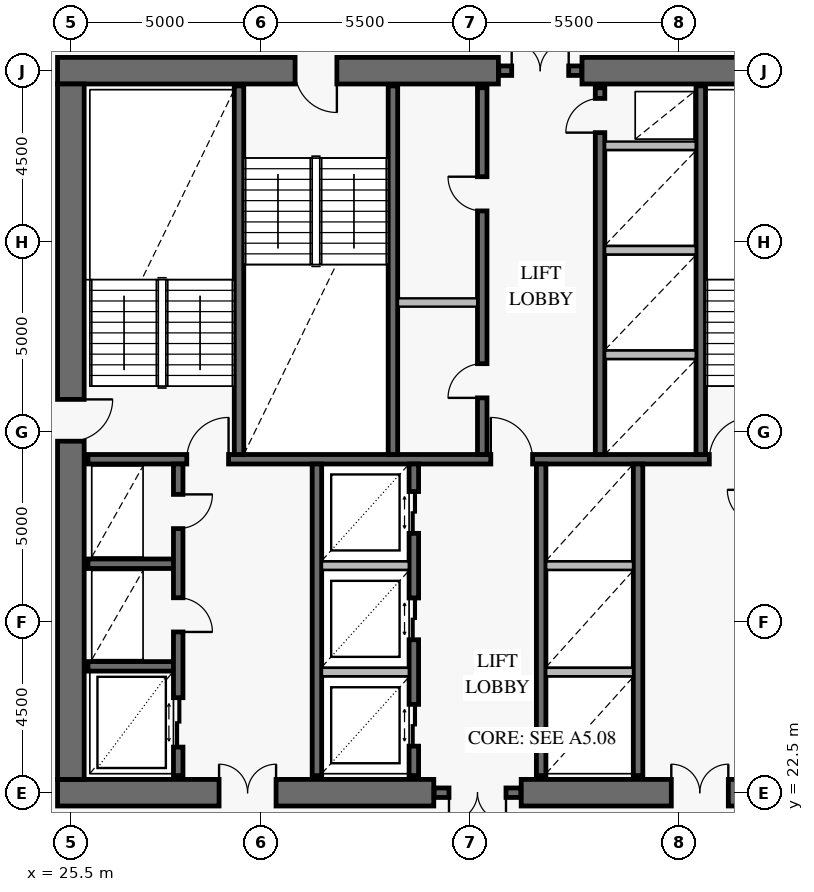
"""IFC4 building model, lengths in metres.
Left out: names, types, materials, properties, quantities, classifications, styles, units other than length and angle.
Written with IfcOpenShell. Run it as: python <this file> out.ifc"""

import sys

from ifc_helpers import new_model, si_unit, direction, frame, frame_2d, origin, place, context, subcontext, project, spatial, rectangle, extrude, element, fill, save


model = new_model("IFC4")
c1 = context("Model", 3, precision=1e-05, world=origin(), true_north=direction((0.0, 1.0)))
c2 = subcontext(c1, "Body", "Model", "MODEL_VIEW")
j1 = project(units=[si_unit("LENGTHUNIT", "METRE"), si_unit("PLANEANGLEUNIT", "RADIAN")], contexts=[c1])
p1 = place(None, origin())
s1 = spatial("IfcSite", under=j1, at=p1, CompositionType="ELEMENT")
p2 = place(p1, origin())
s2 = spatial("IfcBuilding", under=s1, at=p2, CompositionType="ELEMENT")
p3 = place(p2, frame((0.0, 0.0, 126.6)))
s3 = spatial("IfcBuildingStorey", under=s2, at=p3, CompositionType="ELEMENT", Elevation=126.6)
p4 = place(p3, frame((25.15, 22.5, 0.0), z_axis=(0.0, 0.0, 1.0), x_axis=(1.0, 0.0, 0.0)))
e1 = element("IfcWall", 1, at=p4, inside=s3, PredefinedType="SHEAR", context=c2, shape_type="SweptSolid", body=[
    extrude(rectangle(XDim=9.9, YDim=0.7, at=frame_2d((4.95, 0.0))), origin(), (0.0, 0.0, 1.0), 3.8),
])
p5 = place(p4, frame((4.25, 0.0, 0.0)))
e2 = element("IfcOpeningElement", 2, at=p5, cuts=e1, PredefinedType="OPENING", context=c2, shape_type="SweptSolid", body=[
    extrude(rectangle(XDim=1.5, YDim=2.15, at=frame_2d((0.75, 1.075))), frame((0.0, 0.362, 0.0), z_axis=(0.0, -1.0, 0.0), x_axis=(1.0, 0.0, 0.0)), (0.0, 0.0, 1.0), 0.724),
])
p6 = place(p3, frame((37.35, 22.5, 0.0), z_axis=(0.0, 0.0, 1.0), x_axis=(1.0, 0.0, 0.0)))
e3 = element("IfcWall", 3, at=p6, inside=s3, PredefinedType="SHEAR", context=c2, shape_type="SweptSolid", body=[
    extrude(rectangle(XDim=9.5, YDim=0.7, at=frame_2d((4.75, 0.0))), origin(), (0.0, 0.0, 1.0), 3.8),
])
p7 = place(p6, frame((3.95, 0.0, 0.0)))
e4 = element("IfcOpeningElement", 4, at=p7, cuts=e3, PredefinedType="OPENING", context=c2, shape_type="SweptSolid", body=[
    extrude(rectangle(XDim=1.5, YDim=2.15, at=frame_2d((0.75, 1.075))), frame((0.0, 0.362, 0.0), z_axis=(0.0, -1.0, 0.0), x_axis=(1.0, 0.0, 0.0)), (0.0, 0.0, 1.0), 0.724),
])
p8 = place(p3, frame((46.85, 41.5, 0.0), z_axis=(0.0, 0.0, 1.0), x_axis=(-1.0, 0.0, 0.0)))
e5 = element("IfcWall", 5, at=p8, inside=s3, PredefinedType="SHEAR", context=c2, shape_type="SweptSolid", body=[
    extrude(rectangle(XDim=7.9, YDim=0.7, at=frame_2d((3.95, 0.0))), origin(), (0.0, 0.0, 1.0), 3.8),
])
p9 = place(p3, frame((36.75, 41.5, 0.0), z_axis=(0.0, 0.0, 1.0), x_axis=(-1.0, 0.0, 0.0)))
e6 = element("IfcWall", 6, at=p9, inside=s3, PredefinedType="SHEAR", context=c2, shape_type="SweptSolid", body=[
    extrude(rectangle(XDim=11.6, YDim=0.7, at=frame_2d((5.8, 0.0))), origin(), (0.0, 0.0, 1.0), 3.8),
])
p10 = place(p9, frame((4.25, 0.0, 0.0)))
e7 = element("IfcOpeningElement", 7, at=p10, cuts=e6, PredefinedType="OPENING", context=c2, shape_type="SweptSolid", body=[
    extrude(rectangle(XDim=1.1, YDim=2.15, at=frame_2d((0.55, 1.075))), frame((0.0, 0.362, 0.0), z_axis=(0.0, -1.0, 0.0), x_axis=(1.0, 0.0, 0.0)), (0.0, 0.0, 1.0), 0.724),
])
p11 = place(p3, frame((25.5, 22.85, 0.0), z_axis=(0.0, 0.0, 1.0), x_axis=(0.0, 1.0, 0.0)))
e8 = element("IfcWall", 8, at=p11, inside=s3, PredefinedType="SHEAR", context=c2, shape_type="SweptSolid", body=[
    extrude(rectangle(XDim=18.3, YDim=0.7, at=frame_2d((9.15, 0.0))), origin(), (0.0, 0.0, 1.0), 3.8),
])
p12 = place(p11, frame((8.9, 0.0, 0.0)))
e9 = element("IfcOpeningElement", 9, at=p12, cuts=e8, PredefinedType="OPENING", context=c2, shape_type="SweptSolid", body=[
    extrude(rectangle(XDim=1.1, YDim=2.15, at=frame_2d((0.55, 1.075))), frame((0.0, 0.362, 0.0), z_axis=(0.0, -1.0, 0.0), x_axis=(1.0, 0.0, 0.0)), (0.0, 0.0, 1.0), 0.724),
])
p13 = place(p3, frame((35.06, 22.5, 0.0), z_axis=(0.0, 0.0, 1.0), x_axis=(1.0, 0.0, 0.0)))
e10 = element("IfcWall", 10, at=p13, inside=s3, PredefinedType="SOLIDWALL", context=c2, shape_type="SweptSolid", body=[
    extrude(rectangle(XDim=2.28, YDim=0.25, at=frame_2d((1.14, 0.0))), origin(), (0.0, 0.0, 1.0), 3.8),
])
p14 = place(p13, frame((0.39, 0.0, 0.0)))
e11 = element("IfcOpeningElement", 11, at=p14, cuts=e10, PredefinedType="OPENING", context=c2, shape_type="SweptSolid", body=[
    extrude(rectangle(XDim=1.5, YDim=2.15, at=frame_2d((0.75, 1.075))), frame((0.0, 0.137, 0.0), z_axis=(0.0, -1.0, 0.0), x_axis=(1.0, 0.0, 0.0)), (0.0, 0.0, 1.0), 0.274),
])
p15 = place(p3, frame((36.76, 41.5, 0.0), z_axis=(0.0, 0.0, 1.0), x_axis=(1.0, 0.0, 0.0)))
e12 = element("IfcWall", 12, at=p15, inside=s3, PredefinedType="SOLIDWALL", context=c2, shape_type="SweptSolid", body=[
    extrude(rectangle(XDim=2.18, YDim=0.25, at=frame_2d((1.09, 0.0))), origin(), (0.0, 0.0, 1.0), 3.8),
])
p16 = place(p15, frame((0.34, 0.0, 0.0)))
e13 = element("IfcOpeningElement", 13, at=p16, cuts=e12, PredefinedType="OPENING", context=c2, shape_type="SweptSolid", body=[
    extrude(rectangle(XDim=1.5, YDim=2.15, at=frame_2d((0.75, 1.075))), frame((0.0, 0.137, 0.0), z_axis=(0.0, -1.0, 0.0), x_axis=(1.0, 0.0, 0.0)), (0.0, 0.0, 1.0), 0.274),
])
p17 = place(p3, frame((25.95, 31.275, 0.0), z_axis=(0.0, 0.0, 1.0), x_axis=(1.0, 0.0, 0.0)))
e14 = element("IfcWall", 14, at=p17, inside=s3, PredefinedType="SOLIDWALL", context=c2, shape_type="SweptSolid", body=[
    extrude(rectangle(XDim=20.1, YDim=0.25, at=frame_2d((10.05, 0.0))), origin(), (0.0, 0.0, 1.0), 3.8),
])
p18 = place(p17, frame((2.6, 0.0, 0.0)))
e15 = element("IfcOpeningElement", 15, at=p18, cuts=e14, PredefinedType="OPENING", context=c2, shape_type="SweptSolid", body=[
    extrude(rectangle(XDim=1.1, YDim=2.15, at=frame_2d((0.55, 1.075))), frame((0.0, 0.137, 0.0), z_axis=(0.0, -1.0, 0.0), x_axis=(1.0, 0.0, 0.0)), (0.0, 0.0, 1.0), 0.274),
])
p19 = place(p17, frame((10.6, 0.0, 0.0)))
e16 = element("IfcOpeningElement", 16, at=p19, cuts=e14, PredefinedType="OPENING", context=c2, shape_type="SweptSolid", body=[
    extrude(rectangle(XDim=1.1, YDim=2.15, at=frame_2d((0.55, 1.075))), frame((0.0, 0.137, 0.0), z_axis=(0.0, -1.0, 0.0), x_axis=(1.0, 0.0, 0.0)), (0.0, 0.0, 1.0), 0.274),
])
p20 = place(p17, frame((16.35, 0.0, 0.0)))
e17 = element("IfcOpeningElement", 17, at=p20, cuts=e14, PredefinedType="OPENING", context=c2, shape_type="SweptSolid", body=[
    extrude(rectangle(XDim=1.1, YDim=2.15, at=frame_2d((0.55, 1.075))), frame((0.0, 0.137, 0.0), z_axis=(0.0, -1.0, 0.0), x_axis=(1.0, 0.0, 0.0)), (0.0, 0.0, 1.0), 0.274),
])
for number, where, z_axis, x_axis in (
    (18, (29.925, 31.4, 0.0), (0.0, 0.0, 1.0), (0.0, 1.0, 0.0)),
    (19, (33.975, 31.4, 0.0), (0.0, 0.0, 1.0), (0.0, 1.0, 0.0)),
    (20, (42.075, 31.4, 0.0), (0.0, 0.0, 1.0), (0.0, 1.0, 0.0)),
):
    element("IfcWall", number, at=place(p3, frame(where, z_axis=z_axis, x_axis=x_axis)), inside=s3, PredefinedType="SOLIDWALL", context=c2, shape_type="SweptSolid", body=[
        extrude(rectangle(XDim=9.7, YDim=0.25, at=frame_2d((4.85, 0.0))), origin(), (0.0, 0.0, 1.0), 3.8),
    ])
p21 = place(p3, frame((36.325, 31.4, 0.0), z_axis=(0.0, 0.0, 1.0), x_axis=(0.0, 1.0, 0.0)))
e21 = element("IfcWall", 21, at=p21, inside=s3, PredefinedType="SOLIDWALL", context=c2, shape_type="SweptSolid", body=[
    extrude(rectangle(XDim=9.65, YDim=0.25, at=frame_2d((4.825, 0.0))), origin(), (0.0, 0.0, 1.0), 3.8),
])
p22 = place(p21, frame((1.49, 0.0, 0.0)))
e22 = element("IfcOpeningElement", 22, at=p22, cuts=e21, PredefinedType="OPENING", context=c2, shape_type="SweptSolid", body=[
    extrude(rectangle(XDim=0.9, YDim=2.1, at=frame_2d((0.45, 1.05))), frame((0.0, 0.137, 0.0), z_axis=(0.0, -1.0, 0.0), x_axis=(1.0, 0.0, 0.0)), (0.0, 0.0, 1.0), 0.274),
])
p23 = place(p21, frame((6.41, 0.0, 0.0)))
e23 = element("IfcOpeningElement", 23, at=p23, cuts=e21, PredefinedType="OPENING", context=c2, shape_type="SweptSolid", body=[
    extrude(rectangle(XDim=0.9, YDim=2.1, at=frame_2d((0.45, 1.05))), frame((0.0, 0.137, 0.0), z_axis=(0.0, -1.0, 0.0), x_axis=(1.0, 0.0, 0.0)), (0.0, 0.0, 1.0), 0.274),
])
p24 = place(p3, frame((39.425, 31.4, 0.0), z_axis=(0.0, 0.0, 1.0), x_axis=(0.0, 1.0, 0.0)))
e24 = element("IfcWall", 24, at=p24, inside=s3, PredefinedType="SOLIDWALL", context=c2, shape_type="SweptSolid", body=[
    extrude(rectangle(XDim=9.65, YDim=0.25, at=frame_2d((4.825, 0.0))), origin(), (0.0, 0.0, 1.0), 3.8),
])
p25 = place(p24, frame((8.47, 0.0, 0.0)))
e25 = element("IfcOpeningElement", 25, at=p25, cuts=e24, PredefinedType="OPENING", context=c2, shape_type="SweptSolid", body=[
    extrude(rectangle(XDim=0.9, YDim=2.1, at=frame_2d((0.45, 1.05))), frame((0.0, 0.137, 0.0), z_axis=(0.0, -1.0, 0.0), x_axis=(1.0, 0.0, 0.0)), (0.0, 0.0, 1.0), 0.274),
])
for number, where, z_axis, x_axis in (
    (26, (25.95, 25.825, 0.0), (0.0, 0.0, 1.0), (1.0, 0.0, 0.0)),
    (27, (25.95, 28.525, 0.0), (0.0, 0.0, 1.0), (1.0, 0.0, 0.0)),
):
    element("IfcWall", number, at=place(p3, frame(where, z_axis=z_axis, x_axis=x_axis)), inside=s3, PredefinedType="SOLIDWALL", context=c2, shape_type="SweptSolid", body=[
        extrude(rectangle(XDim=2.25, YDim=0.25, at=frame_2d((1.125, 0.0))), origin(), (0.0, 0.0, 1.0), 3.8),
    ])
p26 = place(p3, frame((28.325, 22.95, 0.0), z_axis=(0.0, 0.0, 1.0), x_axis=(0.0, 1.0, 0.0)))
e28 = element("IfcWall", 28, at=p26, inside=s3, PredefinedType="SOLIDWALL", context=c2, shape_type="SweptSolid", body=[
    extrude(rectangle(XDim=8.2, YDim=0.25, at=frame_2d((4.1, 0.0))), origin(), (0.0, 0.0, 1.0), 3.8),
])
p27 = place(p26, frame((0.75, 0.0, 0.0)))
e29 = element("IfcOpeningElement", 29, at=p27, cuts=e28, PredefinedType="OPENING", context=c2, shape_type="SweptSolid", body=[
    extrude(rectangle(XDim=1.3, YDim=2.3, at=frame_2d((0.65, 1.15))), frame((0.0, 0.137, 0.0), z_axis=(0.0, -1.0, 0.0), x_axis=(1.0, 0.0, 0.0)), (0.0, 0.0, 1.0), 0.274),
])
p28 = place(p26, frame((3.78, 0.0, 0.0)))
e30 = element("IfcOpeningElement", 30, at=p28, cuts=e28, PredefinedType="OPENING", context=c2, shape_type="SweptSolid", body=[
    extrude(rectangle(XDim=0.9, YDim=2.1, at=frame_2d((0.45, 1.05))), frame((0.0, 0.137, 0.0), z_axis=(0.0, -1.0, 0.0), x_axis=(1.0, 0.0, 0.0)), (0.0, 0.0, 1.0), 0.274),
])
p29 = place(p26, frame((6.5, 0.0, 0.0)))
e31 = element("IfcOpeningElement", 31, at=p29, cuts=e28, PredefinedType="OPENING", context=c2, shape_type="SweptSolid", body=[
    extrude(rectangle(XDim=0.9, YDim=2.1, at=frame_2d((0.45, 1.05))), frame((0.0, 0.137, 0.0), z_axis=(0.0, -1.0, 0.0), x_axis=(1.0, 0.0, 0.0)), (0.0, 0.0, 1.0), 0.274),
])
p30 = place(p3, frame((31.975, 22.95, 0.0), z_axis=(0.0, 0.0, 1.0), x_axis=(0.0, 1.0, 0.0)))
e32 = element("IfcWall", 32, at=p30, inside=s3, PredefinedType="SOLIDWALL", context=c2, shape_type="SweptSolid", body=[
    extrude(rectangle(XDim=8.2, YDim=0.25, at=frame_2d((4.1, 0.0))), origin(), (0.0, 0.0, 1.0), 3.8),
])
p31 = place(p3, frame((34.525, 22.95, 0.0), z_axis=(0.0, 0.0, 1.0), x_axis=(0.0, 1.0, 0.0)))
e33 = element("IfcWall", 33, at=p31, inside=s3, PredefinedType="SOLIDWALL", context=c2, shape_type="SweptSolid", body=[
    extrude(rectangle(XDim=8.2, YDim=0.25, at=frame_2d((4.1, 0.0))), origin(), (0.0, 0.0, 1.0), 3.8),
])
p32 = place(p31, frame((0.775, 0.0, 0.0)))
e34 = element("IfcOpeningElement", 34, at=p32, cuts=e33, PredefinedType="OPENING", context=c2, shape_type="SweptSolid", body=[
    extrude(rectangle(XDim=1.1, YDim=2.2, at=frame_2d((0.55, 1.1))), frame((0.0, 0.137, 0.0), z_axis=(0.0, -1.0, 0.0), x_axis=(1.0, 0.0, 0.0)), (0.0, 0.0, 1.0), 0.274),
])
p33 = place(p31, frame((3.575, 0.0, 0.0)))
e35 = element("IfcOpeningElement", 35, at=p33, cuts=e33, PredefinedType="OPENING", context=c2, shape_type="SweptSolid", body=[
    extrude(rectangle(XDim=1.1, YDim=2.2, at=frame_2d((0.55, 1.1))), frame((0.0, 0.137, 0.0), z_axis=(0.0, -1.0, 0.0), x_axis=(1.0, 0.0, 0.0)), (0.0, 0.0, 1.0), 0.274),
])
p34 = place(p31, frame((6.375, 0.0, 0.0)))
e36 = element("IfcOpeningElement", 36, at=p34, cuts=e33, PredefinedType="OPENING", context=c2, shape_type="SweptSolid", body=[
    extrude(rectangle(XDim=1.1, YDim=2.2, at=frame_2d((0.55, 1.1))), frame((0.0, 0.137, 0.0), z_axis=(0.0, -1.0, 0.0), x_axis=(1.0, 0.0, 0.0)), (0.0, 0.0, 1.0), 0.274),
])
for number, where, z_axis, x_axis in (
    (37, (37.875, 22.95, 0.0), (0.0, 0.0, 1.0), (0.0, 1.0, 0.0)),
    (38, (40.425, 22.95, 0.0), (0.0, 0.0, 1.0), (0.0, 1.0, 0.0)),
):
    element("IfcWall", number, at=place(p3, frame(where, z_axis=z_axis, x_axis=x_axis)), inside=s3, PredefinedType="SOLIDWALL", context=c2, shape_type="SweptSolid", body=[
        extrude(rectangle(XDim=8.2, YDim=0.25, at=frame_2d((4.1, 0.0))), origin(), (0.0, 0.0, 1.0), 3.8),
    ])
p35 = place(p3, frame((34.108, 35.4, 0.0), z_axis=(0.0, 0.0, 1.0), x_axis=(1.0, 0.0, 0.0)))
e39 = element("IfcWall", 39, at=p35, inside=s3, PredefinedType="PARTITIONING", context=c2, shape_type="SweptSolid", body=[
    extrude(rectangle(XDim=2.084, YDim=0.22, at=frame_2d((1.042, 0.0))), origin(), (0.0, 0.0, 1.0), 3.55),
])
for number, where, z_axis, x_axis in (
    (40, (39.558, 34.025, 0.0), (0.0, 0.0, 1.0), (1.0, 0.0, 0.0)),
    (41, (39.558, 36.775, 0.0), (0.0, 0.0, 1.0), (1.0, 0.0, 0.0)),
    (42, (39.558, 39.525, 0.0), (0.0, 0.0, 1.0), (1.0, 0.0, 0.0)),
):
    element("IfcWall", number, at=place(p3, frame(where, z_axis=z_axis, x_axis=x_axis)), inside=s3, PredefinedType="PARTITIONING", context=c2, shape_type="SweptSolid", body=[
        extrude(rectangle(XDim=2.384, YDim=0.22, at=frame_2d((1.192, 0.0))), origin(), (0.0, 0.0, 1.0), 3.55),
    ])
for number, where, z_axis, x_axis in (
    (43, (32.108, 25.675, 0.0), (0.0, 0.0, 1.0), (1.0, 0.0, 0.0)),
    (44, (32.108, 28.475, 0.0), (0.0, 0.0, 1.0), (1.0, 0.0, 0.0)),
):
    element("IfcWall", number, at=place(p3, frame(where, z_axis=z_axis, x_axis=x_axis)), inside=s3, PredefinedType="PARTITIONING", context=c2, shape_type="SweptSolid", body=[
        extrude(rectangle(XDim=2.284, YDim=0.22, at=frame_2d((1.142, 0.0))), origin(), (0.0, 0.0, 1.0), 3.55),
    ])
for number, where, z_axis, x_axis in (
    (45, (38.008, 25.675, 0.0), (0.0, 0.0, 1.0), (1.0, 0.0, 0.0)),
    (46, (38.008, 28.475, 0.0), (0.0, 0.0, 1.0), (1.0, 0.0, 0.0)),
):
    element("IfcWall", number, at=place(p3, frame(where, z_axis=z_axis, x_axis=x_axis)), inside=s3, PredefinedType="PARTITIONING", context=c2, shape_type="SweptSolid", body=[
        extrude(rectangle(XDim=2.284, YDim=0.22, at=frame_2d((1.142, 0.0))), origin(), (0.0, 0.0, 1.0), 3.55),
    ])
p36 = place(p12, frame((1.1, 0.0, 0.0), z_axis=(0.0, 0.0, 1.0), x_axis=(-1.0, 0.0, 0.0)))
e47 = element("IfcDoor", 47, at=p36, inside=s3, OperationType="SINGLE_SWING_LEFT", PredefinedType="USERDEFINED", context=c2, shape_type="SweptSolid", body=[
    extrude(rectangle(XDim=1.1, YDim=2.15, at=frame_2d((0.55, 1.075))), frame((0.0, 0.025, 0.0), z_axis=(0.0, -1.0, 0.0), x_axis=(1.0, 0.0, 0.0)), (0.0, 0.0, 1.0), 0.05),
])
fill(e9, e47)
p37 = place(p10, origin())
e48 = element("IfcDoor", 48, at=p37, inside=s3, OperationType="SINGLE_SWING_LEFT", PredefinedType="USERDEFINED", context=c2, shape_type="SweptSolid", body=[
    extrude(rectangle(XDim=1.1, YDim=2.15, at=frame_2d((0.55, 1.075))), frame((0.0, 0.025, 0.0), z_axis=(0.0, -1.0, 0.0), x_axis=(1.0, 0.0, 0.0)), (0.0, 0.0, 1.0), 0.05),
])
fill(e7, e48)
p38 = place(p5, origin())
e49 = element("IfcDoor", 49, at=p38, inside=s3, OperationType="DOUBLE_DOOR_SINGLE_SWING", PredefinedType="DOOR", context=c2, shape_type="SweptSolid", body=[
    extrude(rectangle(XDim=1.5, YDim=2.15, at=frame_2d((0.75, 1.075))), frame((0.0, 0.025, 0.0), z_axis=(0.0, -1.0, 0.0), x_axis=(1.0, 0.0, 0.0)), (0.0, 0.0, 1.0), 0.05),
])
fill(e2, e49)
p39 = place(p7, origin())
e50 = element("IfcDoor", 50, at=p39, inside=s3, OperationType="DOUBLE_DOOR_SINGLE_SWING", PredefinedType="DOOR", context=c2, shape_type="SweptSolid", body=[
    extrude(rectangle(XDim=1.5, YDim=2.15, at=frame_2d((0.75, 1.075))), frame((0.0, 0.025, 0.0), z_axis=(0.0, -1.0, 0.0), x_axis=(1.0, 0.0, 0.0)), (0.0, 0.0, 1.0), 0.05),
])
fill(e4, e50)
p40 = place(p14, frame((1.5, 0.0, 0.0), z_axis=(0.0, 0.0, 1.0), x_axis=(-1.0, 0.0, 0.0)))
e51 = element("IfcDoor", 51, at=p40, inside=s3, OperationType="DOUBLE_DOOR_SINGLE_SWING", PredefinedType="DOOR", context=c2, shape_type="SweptSolid", body=[
    extrude(rectangle(XDim=1.5, YDim=2.15, at=frame_2d((0.75, 1.075))), frame((0.0, 0.025, 0.0), z_axis=(0.0, -1.0, 0.0), x_axis=(1.0, 0.0, 0.0)), (0.0, 0.0, 1.0), 0.05),
])
fill(e11, e51)
p41 = place(p16, origin())
e52 = element("IfcDoor", 52, at=p41, inside=s3, OperationType="DOUBLE_DOOR_SINGLE_SWING", PredefinedType="DOOR", context=c2, shape_type="SweptSolid", body=[
    extrude(rectangle(XDim=1.5, YDim=2.15, at=frame_2d((0.75, 1.075))), frame((0.0, 0.025, 0.0), z_axis=(0.0, -1.0, 0.0), x_axis=(1.0, 0.0, 0.0)), (0.0, 0.0, 1.0), 0.05),
])
fill(e13, e52)
p42 = place(p18, origin())
e53 = element("IfcDoor", 53, at=p42, inside=s3, OperationType="SINGLE_SWING_RIGHT", PredefinedType="USERDEFINED", context=c2, shape_type="SweptSolid", body=[
    extrude(rectangle(XDim=1.1, YDim=2.15, at=frame_2d((0.55, 1.075))), frame((0.0, 0.025, 0.0), z_axis=(0.0, -1.0, 0.0), x_axis=(1.0, 0.0, 0.0)), (0.0, 0.0, 1.0), 0.05),
])
fill(e15, e53)
p43 = place(p19, origin())
e54 = element("IfcDoor", 54, at=p43, inside=s3, OperationType="SINGLE_SWING_LEFT", PredefinedType="USERDEFINED", context=c2, shape_type="SweptSolid", body=[
    extrude(rectangle(XDim=1.1, YDim=2.15, at=frame_2d((0.55, 1.075))), frame((0.0, 0.025, 0.0), z_axis=(0.0, -1.0, 0.0), x_axis=(1.0, 0.0, 0.0)), (0.0, 0.0, 1.0), 0.05),
])
fill(e16, e54)
p44 = place(p20, origin())
e55 = element("IfcDoor", 55, at=p44, inside=s3, OperationType="SINGLE_SWING_RIGHT", PredefinedType="USERDEFINED", context=c2, shape_type="SweptSolid", body=[
    extrude(rectangle(XDim=1.1, YDim=2.15, at=frame_2d((0.55, 1.075))), frame((0.0, 0.025, 0.0), z_axis=(0.0, -1.0, 0.0), x_axis=(1.0, 0.0, 0.0)), (0.0, 0.0, 1.0), 0.05),
])
fill(e17, e55)
p45 = place(p22, origin())
e56 = element("IfcDoor", 56, at=p45, inside=s3, OperationType="SINGLE_SWING_LEFT", PredefinedType="DOOR", context=c2, shape_type="SweptSolid", body=[
    extrude(rectangle(XDim=0.9, YDim=2.1, at=frame_2d((0.45, 1.05))), frame((0.0, 0.025, 0.0), z_axis=(0.0, -1.0, 0.0), x_axis=(1.0, 0.0, 0.0)), (0.0, 0.0, 1.0), 0.05),
])
fill(e22, e56)
p46 = place(p23, origin())
e57 = element("IfcDoor", 57, at=p46, inside=s3, OperationType="SINGLE_SWING_RIGHT", PredefinedType="DOOR", context=c2, shape_type="SweptSolid", body=[
    extrude(rectangle(XDim=0.9, YDim=2.1, at=frame_2d((0.45, 1.05))), frame((0.0, 0.025, 0.0), z_axis=(0.0, -1.0, 0.0), x_axis=(1.0, 0.0, 0.0)), (0.0, 0.0, 1.0), 0.05),
])
fill(e23, e57)
p47 = place(p25, origin())
e58 = element("IfcDoor", 58, at=p47, inside=s3, OperationType="SINGLE_SWING_LEFT", PredefinedType="DOOR", context=c2, shape_type="SweptSolid", body=[
    extrude(rectangle(XDim=0.9, YDim=2.1, at=frame_2d((0.45, 1.05))), frame((0.0, 0.025, 0.0), z_axis=(0.0, -1.0, 0.0), x_axis=(1.0, 0.0, 0.0)), (0.0, 0.0, 1.0), 0.05),
])
fill(e25, e58)
p48 = place(p27, frame((1.3, 0.0, 0.0), z_axis=(0.0, 0.0, 1.0), x_axis=(-1.0, 0.0, 0.0)))
e59 = element("IfcDoor", 59, at=p48, inside=s3, OperationType="DOUBLE_DOOR_SLIDING", PredefinedType="DOOR", context=c2, shape_type="SweptSolid", body=[
    extrude(rectangle(XDim=1.3, YDim=2.3, at=frame_2d((0.65, 1.15))), frame((0.0, 0.025, 0.0), z_axis=(0.0, -1.0, 0.0), x_axis=(1.0, 0.0, 0.0)), (0.0, 0.0, 1.0), 0.05),
])
fill(e29, e59)
p49 = place(p28, frame((0.9, 0.0, 0.0), z_axis=(0.0, 0.0, 1.0), x_axis=(-1.0, 0.0, 0.0)))
e60 = element("IfcDoor", 60, at=p49, inside=s3, OperationType="SINGLE_SWING_RIGHT", PredefinedType="DOOR", context=c2, shape_type="SweptSolid", body=[
    extrude(rectangle(XDim=0.9, YDim=2.1, at=frame_2d((0.45, 1.05))), frame((0.0, 0.025, 0.0), z_axis=(0.0, -1.0, 0.0), x_axis=(1.0, 0.0, 0.0)), (0.0, 0.0, 1.0), 0.05),
])
fill(e30, e60)
p50 = place(p29, frame((0.9, 0.0, 0.0), z_axis=(0.0, 0.0, 1.0), x_axis=(-1.0, 0.0, 0.0)))
e61 = element("IfcDoor", 61, at=p50, inside=s3, OperationType="SINGLE_SWING_LEFT", PredefinedType="DOOR", context=c2, shape_type="SweptSolid", body=[
    extrude(rectangle(XDim=0.9, YDim=2.1, at=frame_2d((0.45, 1.05))), frame((0.0, 0.025, 0.0), z_axis=(0.0, -1.0, 0.0), x_axis=(1.0, 0.0, 0.0)), (0.0, 0.0, 1.0), 0.05),
])
fill(e31, e61)
p51 = place(p32, frame((1.1, 0.0, 0.0), z_axis=(0.0, 0.0, 1.0), x_axis=(-1.0, 0.0, 0.0)))
e62 = element("IfcDoor", 62, at=p51, inside=s3, OperationType="DOUBLE_DOOR_SLIDING", PredefinedType="DOOR", context=c2, shape_type="SweptSolid", body=[
    extrude(rectangle(XDim=1.1, YDim=2.2, at=frame_2d((0.55, 1.1))), frame((0.0, 0.025, 0.0), z_axis=(0.0, -1.0, 0.0), x_axis=(1.0, 0.0, 0.0)), (0.0, 0.0, 1.0), 0.05),
])
fill(e34, e62)
p52 = place(p33, frame((1.1, 0.0, 0.0), z_axis=(0.0, 0.0, 1.0), x_axis=(-1.0, 0.0, 0.0)))
e63 = element("IfcDoor", 63, at=p52, inside=s3, OperationType="DOUBLE_DOOR_SLIDING", PredefinedType="DOOR", context=c2, shape_type="SweptSolid", body=[
    extrude(rectangle(XDim=1.1, YDim=2.2, at=frame_2d((0.55, 1.1))), frame((0.0, 0.025, 0.0), z_axis=(0.0, -1.0, 0.0), x_axis=(1.0, 0.0, 0.0)), (0.0, 0.0, 1.0), 0.05),
])
fill(e35, e63)
p53 = place(p34, frame((1.1, 0.0, 0.0), z_axis=(0.0, 0.0, 1.0), x_axis=(-1.0, 0.0, 0.0)))
e64 = element("IfcDoor", 64, at=p53, inside=s3, OperationType="DOUBLE_DOOR_SLIDING", PredefinedType="DOOR", context=c2, shape_type="SweptSolid", body=[
    extrude(rectangle(XDim=1.1, YDim=2.2, at=frame_2d((0.55, 1.1))), frame((0.0, 0.025, 0.0), z_axis=(0.0, -1.0, 0.0), x_axis=(1.0, 0.0, 0.0)), (0.0, 0.0, 1.0), 0.05),
])
fill(e36, e64)
save(model, sys.argv[1])
